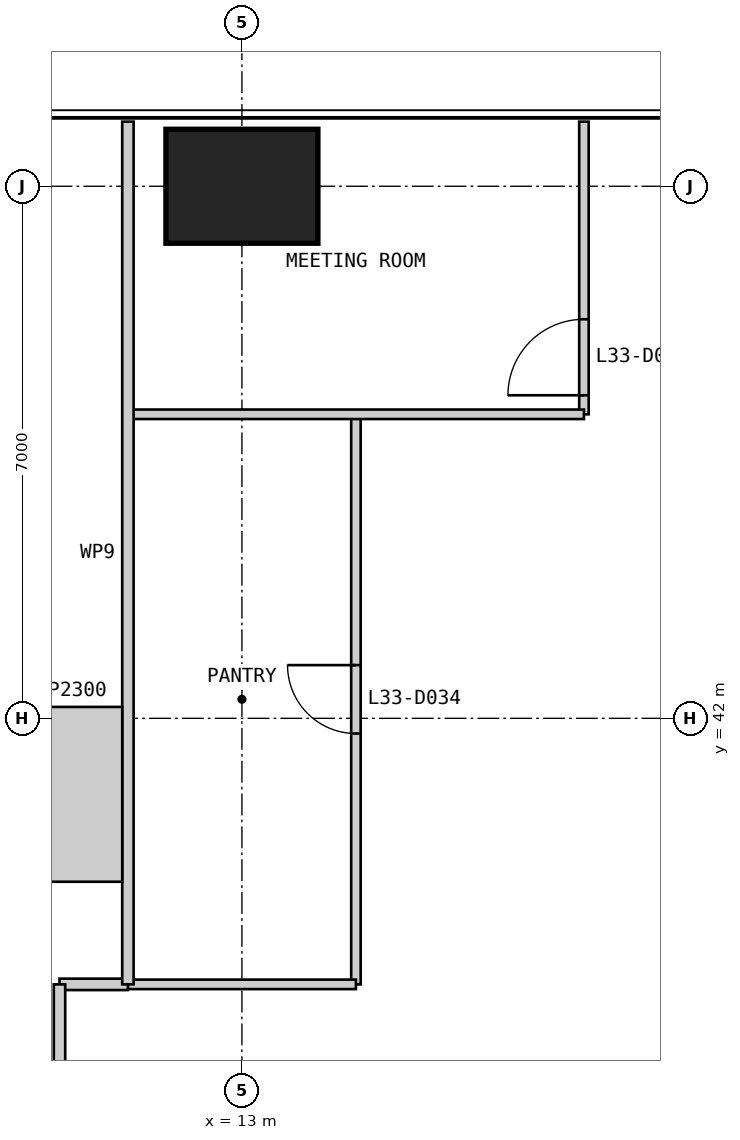
"""IFC4 building model, lengths in metres.
Left out: names, types, materials, properties, quantities, classifications, styles, units other than length and angle.
Written with IfcOpenShell. Run it as: python <this file> out.ifc"""

import sys

from ifc_helpers import new_model, si_unit, direction, frame, frame_2d, origin, origin_2d, place, context, subcontext, project, spatial, rectangle, extrude, element, fill, save


model = new_model("IFC4")
c1 = context("Model", 3, precision=1e-05, world=origin(), true_north=direction((0.0, 1.0)))
c2 = subcontext(c1, "Body", "Model", "MODEL_VIEW")
j1 = project(units=[si_unit("LENGTHUNIT", "METRE"), si_unit("PLANEANGLEUNIT", "RADIAN")], contexts=[c1])
p1 = place(None, origin())
s1 = spatial("IfcSite", under=j1, at=p1, CompositionType="ELEMENT")
p2 = place(p1, origin())
s2 = spatial("IfcBuilding", under=s1, at=p2, CompositionType="ELEMENT")
p3 = place(p2, frame((0.0, 0.0, 142.4)))
s3 = spatial("IfcBuildingStorey", under=s2, at=p3, CompositionType="ELEMENT", Elevation=142.4)
p4 = place(p3, frame((13.0, 49.0, 0.0), z_axis=(0.0, 0.0, 1.0), x_axis=(1.0, 0.0, 0.0)))
e1 = element("IfcColumn", 1, at=p4, inside=s3, PredefinedType="COLUMN", context=c2, shape_type="SweptSolid", body=[
    extrude(rectangle(XDim=2.0, YDim=1.5, at=origin_2d()), origin(), (0.0, 0.0, 1.0), 4.0),
])
p5 = place(p3, frame((17.5, 49.85, 0.0), z_axis=(0.0, 0.0, 1.0), x_axis=(0.0, -1.0, 0.0)))
e2 = element("IfcWall", 2, at=p5, inside=s3, PredefinedType="PARTITIONING", context=c2, shape_type="SweptSolid", body=[
    extrude(rectangle(XDim=3.85, YDim=0.125, at=frame_2d((1.925, 0.0))), origin(), (0.0, 0.0, 1.0), 3.85),
])
p6 = place(p5, frame((2.6, 0.0, 0.0)))
e3 = element("IfcOpeningElement", 3, at=p6, cuts=e2, PredefinedType="OPENING", context=c2, shape_type="SweptSolid", body=[
    extrude(rectangle(XDim=1.0, YDim=2.2, at=frame_2d((0.5, 1.1))), frame((0.0, 0.073, 0.0), z_axis=(0.0, -1.0, 0.0), x_axis=(1.0, 0.0, 0.0)), (0.0, 0.0, 1.0), 0.145),
])
p7 = place(p3, frame((14.5, 46.0, 0.0), z_axis=(0.0, 0.0, 1.0), x_axis=(0.0, -1.0, 0.0)))
e4 = element("IfcWall", 4, at=p7, inside=s3, PredefinedType="PARTITIONING", context=c2, shape_type="SweptSolid", body=[
    extrude(rectangle(XDim=7.5, YDim=0.125, at=frame_2d((3.75, 0.0))), origin(), (0.0, 0.0, 1.0), 3.85),
])
p8 = place(p7, frame((3.3, 0.0, 0.0)))
e5 = element("IfcOpeningElement", 5, at=p8, cuts=e4, PredefinedType="OPENING", context=c2, shape_type="SweptSolid", body=[
    extrude(rectangle(XDim=0.9, YDim=2.2, at=frame_2d((0.45, 1.1))), frame((0.0, 0.073, 0.0), z_axis=(0.0, -1.0, 0.0), x_axis=(1.0, 0.0, 0.0)), (0.0, 0.0, 1.0), 0.145),
])
p9 = place(p3, frame((17.5, 46.0, 0.0), z_axis=(0.0, 0.0, 1.0), x_axis=(-1.0, 0.0, 0.0)))
e6 = element("IfcWall", 6, at=p9, inside=s3, PredefinedType="PARTITIONING", context=c2, shape_type="SweptSolid", body=[
    extrude(rectangle(XDim=6.0, YDim=0.125, at=frame_2d((3.0, 0.0))), origin(), (0.0, 0.0, 1.0), 3.85),
])
p10 = place(p3, frame((14.5, 38.5, 0.0), z_axis=(0.0, 0.0, 1.0), x_axis=(-1.0, 0.0, 0.0)))
e7 = element("IfcWall", 7, at=p10, inside=s3, PredefinedType="PARTITIONING", context=c2, shape_type="SweptSolid", body=[
    extrude(rectangle(XDim=3.0, YDim=0.125, at=frame_2d((1.5, 0.0))), origin(), (0.0, 0.0, 1.0), 3.85),
])
p11 = place(p3, frame((11.5, 38.5, 0.0), z_axis=(0.0, 0.0, 1.0), x_axis=(-1.0, 0.0, 0.0)))
e8 = element("IfcWall", 8, at=p11, inside=s3, PredefinedType="PARTITIONING", context=c2, shape_type="SweptSolid", body=[
    extrude(rectangle(XDim=0.9, YDim=0.15, at=frame_2d((0.45, 0.0))), origin(), (0.0, 0.0, 1.0), 3.85),
])
p12 = place(p3, frame((10.6, 38.5, 0.0), z_axis=(0.0, 0.0, 1.0), x_axis=(0.0, -1.0, 0.0)))
e9 = element("IfcWall", 9, at=p12, inside=s3, PredefinedType="PARTITIONING", context=c2, shape_type="SweptSolid", body=[
    extrude(rectangle(XDim=27.9, YDim=0.15, at=frame_2d((13.95, 0.0))), origin(), (0.0, 0.0, 1.0), 3.85),
])
p13 = place(p12, frame((3.25, 0.0, 0.0)))
e10 = element("IfcOpeningElement", 10, at=p13, cuts=e9, PredefinedType="OPENING", context=c2, shape_type="SweptSolid", body=[
    extrude(rectangle(XDim=1.0, YDim=2.2, at=frame_2d((0.5, 1.1))), frame((0.0, 0.085, 0.0), z_axis=(0.0, -1.0, 0.0), x_axis=(1.0, 0.0, 0.0)), (0.0, 0.0, 1.0), 0.17),
])
p14 = place(p12, frame((25.75, 0.0, 0.0)))
e11 = element("IfcOpeningElement", 11, at=p14, cuts=e9, PredefinedType="OPENING", context=c2, shape_type="SweptSolid", body=[
    extrude(rectangle(XDim=1.0, YDim=2.2, at=frame_2d((0.5, 1.1))), frame((0.0, 0.085, 0.0), z_axis=(0.0, -1.0, 0.0), x_axis=(1.0, 0.0, 0.0)), (0.0, 0.0, 1.0), 0.17),
])
p15 = place(p3, frame((11.5, 49.85, 0.0), z_axis=(0.0, 0.0, 1.0), x_axis=(0.0, -1.0, 0.0)))
e12 = element("IfcWall", 12, at=p15, inside=s3, PredefinedType="PARTITIONING", context=c2, shape_type="SweptSolid", body=[
    extrude(rectangle(XDim=11.35, YDim=0.15, at=frame_2d((5.675, 0.0))), origin(), (0.0, 0.0, 1.0), 3.85),
])
p16 = place(p3, frame((11.425, 41.0, 0.0), z_axis=(0.0, 0.0, 1.0), x_axis=(-1.0, 0.0, 0.0)))
e13 = element("IfcWall", 13, at=p16, inside=s3, PredefinedType="PARTITIONING", context=c2, shape_type="SweptSolid", body=[
    extrude(rectangle(XDim=1.325, YDim=2.3, at=frame_2d((0.663, 0.0))), origin(), (0.0, 0.0, 1.0), 3.85),
])
p17 = place(p6, frame((1.0, 0.0, 0.0), z_axis=(0.0, 0.0, 1.0), x_axis=(-1.0, 0.0, 0.0)))
e14 = element("IfcDoor", 14, at=p17, inside=s3, OperationType="SINGLE_SWING_LEFT", PredefinedType="DOOR", context=c2, shape_type="SweptSolid", body=[
    extrude(rectangle(XDim=1.0, YDim=2.2, at=frame_2d((0.5, 1.1))), frame((0.0, 0.025, 0.0), z_axis=(0.0, -1.0, 0.0), x_axis=(1.0, 0.0, 0.0)), (0.0, 0.0, 1.0), 0.05),
])
fill(e3, e14)
p18 = place(p8, frame((0.9, 0.0, 0.0), z_axis=(0.0, 0.0, 1.0), x_axis=(-1.0, 0.0, 0.0)))
e15 = element("IfcDoor", 15, at=p18, inside=s3, OperationType="SINGLE_SWING_RIGHT", PredefinedType="DOOR", context=c2, shape_type="SweptSolid", body=[
    extrude(rectangle(XDim=0.9, YDim=2.2, at=frame_2d((0.45, 1.1))), frame((0.0, 0.025, 0.0), z_axis=(0.0, -1.0, 0.0), x_axis=(1.0, 0.0, 0.0)), (0.0, 0.0, 1.0), 0.05),
])
fill(e5, e15)
save(model, sys.argv[1])
